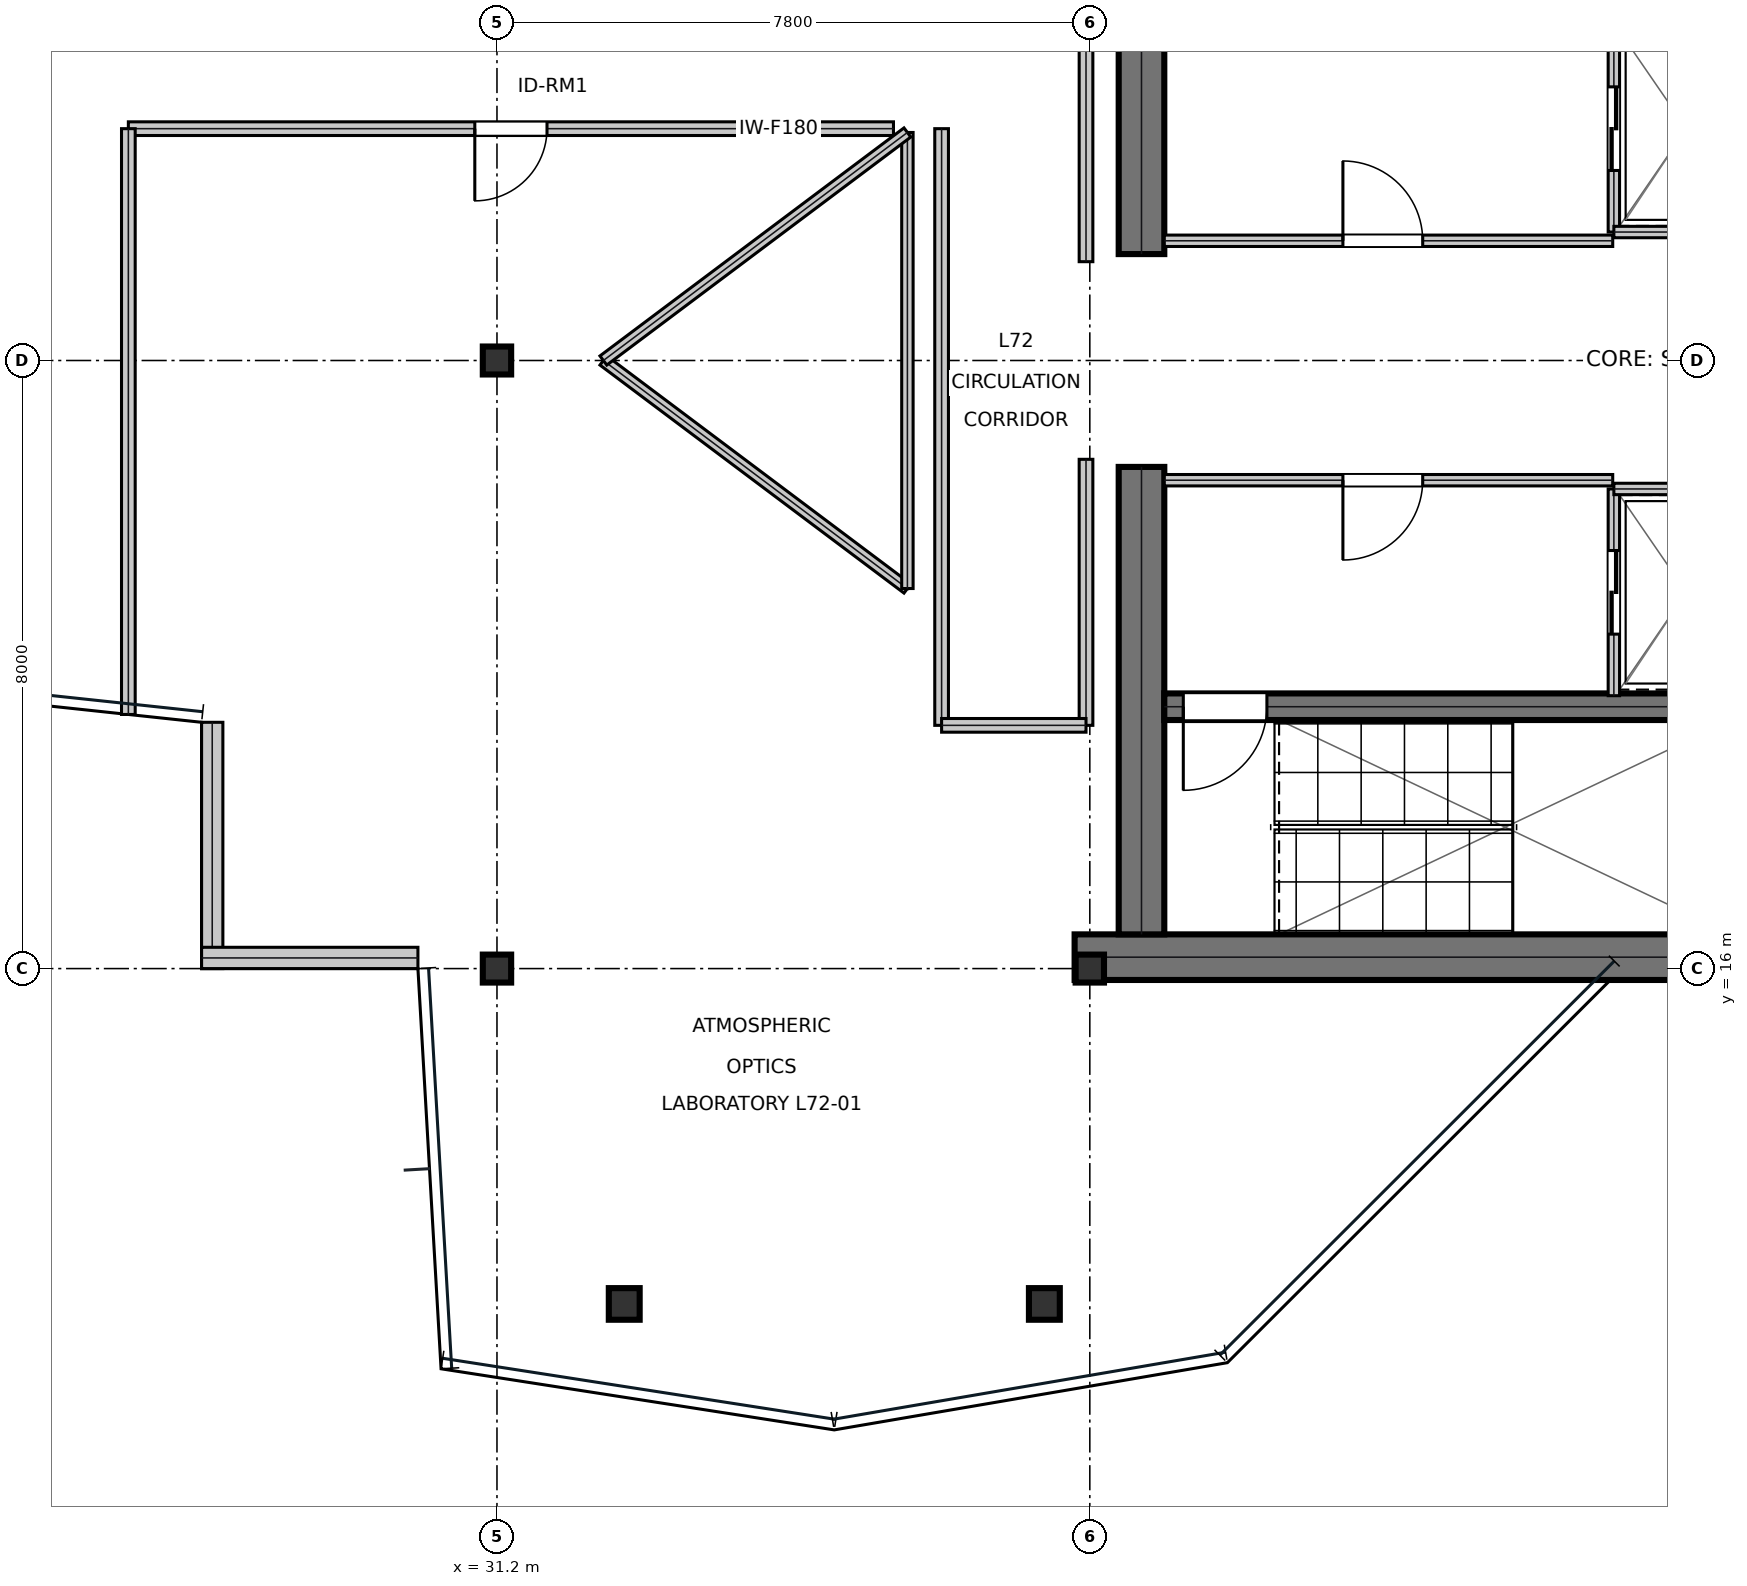
"""IFC4 building model, lengths in metres.
Left out: names, types, materials, properties, quantities, classifications, styles, units other than length and angle.
Written with IfcOpenShell. Run it as: python <this file> out.ifc"""

import sys

from ifc_helpers import new_model, si_unit, direction, frame, frame_2d, origin, origin_2d, place, context, subcontext, project, spatial, rectangle, i_section, extrude, element, fill, save


model = new_model("IFC4")
c1 = context("Model", 3, precision=1e-05, world=origin(), true_north=direction((0.0, 1.0)))
c2 = subcontext(c1, "Body", "Model", "MODEL_VIEW")
j1 = project(units=[si_unit("LENGTHUNIT", "METRE"), si_unit("PLANEANGLEUNIT", "RADIAN")], contexts=[c1])
p1 = place(None, origin())
s1 = spatial("IfcSite", under=j1, at=p1, CompositionType="ELEMENT")
p2 = place(p1, origin())
s2 = spatial("IfcBuilding", under=s1, at=p2, CompositionType="ELEMENT")
p3 = place(p2, frame((0.0, 0.0, 307.35)))
s3 = spatial("IfcBuildingStorey", under=s2, at=p3, CompositionType="ELEMENT", Elevation=307.35)
p4 = place(p3, frame((38.8, 16.15, 0.0), z_axis=(0.0, 0.0, 1.0), x_axis=(1.0, 0.0, 0.0)))
e1 = element("IfcWall", 1, at=p4, inside=s3, PredefinedType="SHEAR", context=c2, shape_type="SweptSolid", body=[
    extrude(rectangle(XDim=16.0, YDim=0.6, at=frame_2d((8.0, 0.0))), origin(), (0.0, 0.0, 1.0), 3.81),
])
for number, where, z_axis, x_axis in (
    (2, (39.68, 16.45, 0.0), (0.0, 0.0, 1.0), (0.0, 1.0, 0.0)),
    (3, (39.68, 25.4, 0.0), (0.0, 0.0, 1.0), (0.0, 1.0, 0.0)),
):
    element("IfcWall", number, at=place(p3, frame(where, z_axis=z_axis, x_axis=x_axis)), inside=s3, PredefinedType="SHEAR", context=c2, shape_type="SweptSolid", body=[
        extrude(rectangle(XDim=6.15, YDim=0.6, at=frame_2d((3.075, 0.0))), origin(), (0.0, 0.0, 1.0), 3.81),
    ])
p5 = place(p3, frame((39.98, 19.445, 0.0), z_axis=(0.0, 0.0, 1.0), x_axis=(1.0, 0.0, 0.0)))
e4 = element("IfcWall", 4, at=p5, inside=s3, PredefinedType="SHEAR", context=c2, shape_type="SweptSolid", body=[
    extrude(rectangle(XDim=7.71, YDim=0.35, at=frame_2d((3.855, 0.0))), origin(), (0.0, 0.0, 1.0), 3.81),
])
p6 = place(p5, frame((0.25, 0.0, 0.0)))
e5 = element("IfcOpeningElement", 5, at=p6, cuts=e4, PredefinedType="OPENING", context=c2, shape_type="SweptSolid", body=[
    extrude(rectangle(XDim=1.1, YDim=2.15, at=frame_2d((0.55, 1.075))), frame((0.0, 0.185, 0.0), z_axis=(0.0, -1.0, 0.0), x_axis=(1.0, 0.0, 0.0)), (0.0, 0.0, 1.0), 0.37),
])
for number, where, z_axis, x_axis in (
    (6, (31.2, 16.0, 0.0), (0.0, 0.0, 1.0), (1.0, 0.0, 0.0)),
    (7, (31.2, 24.0, 0.0), (0.0, 0.0, 1.0), (1.0, 0.0, 0.0)),
    (8, (39.0, 16.0, 0.0), (0.0, 0.0, 1.0), (1.0, 0.0, 0.0)),
):
    element("IfcColumn", number, at=place(p3, frame(where, z_axis=z_axis, x_axis=x_axis)), inside=s3, PredefinedType="COLUMN", context=c2, shape_type="SweptSolid", body=[
        extrude(i_section(OverallWidth=0.373, OverallDepth=0.368, WebThickness=0.015, FlangeThickness=0.024, at=origin_2d()), origin(), (0.0, 0.0, 1.0), 4.044),
    ])
for number, where, z_axis, x_axis in (
    (9, (32.875, 11.588, 0.016), (0.0, 0.0, 1.0), (1.0, 0.0, 0.0)),
    (10, (38.402, 11.588, 0.016), (0.0, 0.0, 1.0), (1.0, 0.0, 0.0)),
):
    element("IfcColumn", number, at=place(p3, frame(where, z_axis=z_axis, x_axis=x_axis)), inside=s3, PredefinedType="COLUMN", context=c2, shape_type="SweptSolid", body=[
        extrude(i_section(OverallWidth=0.406, OverallDepth=0.416, WebThickness=0.03, FlangeThickness=0.048, at=origin_2d()), origin(), (0.0, 0.0, 1.0), 4.018),
    ])
p7 = place(p3, frame((27.454, 19.24, 0.0), z_axis=(0.0, 0.0, 1.0), x_axis=(0.0, -1.0, 0.0)))
e11 = element("IfcWall", 11, at=p7, inside=s3, PredefinedType="STANDARD", context=c2, shape_type="SweptSolid", body=[
    extrude(rectangle(XDim=3.24, YDim=0.28, at=frame_2d((1.62, 0.0))), origin(), (0.0, 0.0, 1.0), 3.339),
])
p8 = place(p3, frame((27.314, 16.14, 0.0), z_axis=(0.0, 0.0, 1.0), x_axis=(1.0, 0.0, 0.0)))
e12 = element("IfcWall", 12, at=p8, inside=s3, PredefinedType="STANDARD", context=c2, shape_type="SweptSolid", body=[
    extrude(rectangle(XDim=2.846, YDim=0.28, at=frame_2d((1.423, 0.0))), origin(), (0.0, 0.0, 1.0), 3.81),
])
p9 = place(p3, frame((39.98, 25.575, 0.0), z_axis=(0.0, 0.0, 1.0), x_axis=(1.0, 0.0, 0.0)))
e13 = element("IfcWall", 13, at=p9, inside=s3, PredefinedType="PARTITIONING", context=c2, shape_type="SweptSolid", body=[
    extrude(rectangle(XDim=5.9, YDim=0.15, at=frame_2d((2.95, 0.0))), origin(), (0.0, 0.0, 1.0), 3.81),
])
p10 = place(p9, frame((2.35, 0.0, 0.0)))
e14 = element("IfcOpeningElement", 14, at=p10, cuts=e13, PredefinedType="OPENING", context=c2, shape_type="SweptSolid", body=[
    extrude(rectangle(XDim=1.05, YDim=2.15, at=frame_2d((0.525, 1.075))), frame((0.0, 0.085, 0.0), z_axis=(0.0, -1.0, 0.0), x_axis=(1.0, 0.0, 0.0)), (0.0, 0.0, 1.0), 0.17),
])
p11 = place(p3, frame((39.98, 22.425, 0.0), z_axis=(0.0, 0.0, 1.0), x_axis=(1.0, 0.0, 0.0)))
e15 = element("IfcWall", 15, at=p11, inside=s3, PredefinedType="PARTITIONING", context=c2, shape_type="SweptSolid", body=[
    extrude(rectangle(XDim=5.9, YDim=0.15, at=frame_2d((2.95, 0.0))), origin(), (0.0, 0.0, 1.0), 3.81),
])
p12 = place(p11, frame((2.35, 0.0, 0.0)))
e16 = element("IfcOpeningElement", 16, at=p12, cuts=e15, PredefinedType="OPENING", context=c2, shape_type="SweptSolid", body=[
    extrude(rectangle(XDim=1.05, YDim=2.15, at=frame_2d((0.525, 1.075))), frame((0.0, 0.085, 0.0), z_axis=(0.0, -1.0, 0.0), x_axis=(1.0, 0.0, 0.0)), (0.0, 0.0, 1.0), 0.17),
])
p13 = place(p3, frame((45.895, 25.69, 0.0), z_axis=(0.0, 0.0, 1.0), x_axis=(0.0, 1.0, 0.0)))
e17 = element("IfcWall", 17, at=p13, inside=s3, PredefinedType="PARTITIONING", context=c2, shape_type="SweptSolid", body=[
    extrude(rectangle(XDim=2.72, YDim=0.15, at=frame_2d((1.36, 0.0))), origin(), (0.0, 0.0, 1.0), 3.81),
])
p14 = place(p13, frame((0.81, 0.0, 0.0)))
e18 = element("IfcOpeningElement", 18, at=p14, cuts=e17, PredefinedType="OPENING", context=c2, shape_type="SweptSolid", body=[
    extrude(rectangle(XDim=1.1, YDim=2.15, at=frame_2d((0.55, 1.075))), frame((0.0, 0.085, 0.0), z_axis=(0.0, -1.0, 0.0), x_axis=(1.0, 0.0, 0.0)), (0.0, 0.0, 1.0), 0.17),
])
p15 = place(p3, frame((45.895, 25.69, 0.0), z_axis=(0.0, 0.0, 1.0), x_axis=(1.0, 0.0, 0.0)))
e19 = element("IfcWall", 19, at=p15, inside=s3, PredefinedType="PARTITIONING", context=c2, shape_type="SweptSolid", body=[
    extrude(rectangle(XDim=1.915, YDim=0.15, at=frame_2d((0.958, 0.0))), origin(), (0.0, 0.0, 1.0), 3.81),
])
p16 = place(p3, frame((45.895, 19.59, 0.0), z_axis=(0.0, 0.0, 1.0), x_axis=(0.0, 1.0, 0.0)))
e20 = element("IfcWall", 20, at=p16, inside=s3, PredefinedType="PARTITIONING", context=c2, shape_type="SweptSolid", body=[
    extrude(rectangle(XDim=2.72, YDim=0.15, at=frame_2d((1.36, 0.0))), origin(), (0.0, 0.0, 1.0), 3.81),
])
p17 = place(p16, frame((0.81, 0.0, 0.0)))
e21 = element("IfcOpeningElement", 21, at=p17, cuts=e20, PredefinedType="OPENING", context=c2, shape_type="SweptSolid", body=[
    extrude(rectangle(XDim=1.1, YDim=2.15, at=frame_2d((0.55, 1.075))), frame((0.0, 0.085, 0.0), z_axis=(0.0, -1.0, 0.0), x_axis=(1.0, 0.0, 0.0)), (0.0, 0.0, 1.0), 0.17),
])
p18 = place(p3, frame((45.895, 22.31, 0.0), z_axis=(0.0, 0.0, 1.0), x_axis=(1.0, 0.0, 0.0)))
e22 = element("IfcWall", 22, at=p18, inside=s3, PredefinedType="PARTITIONING", context=c2, shape_type="SweptSolid", body=[
    extrude(rectangle(XDim=1.915, YDim=0.15, at=frame_2d((0.958, 0.0))), origin(), (0.0, 0.0, 1.0), 3.81),
])
p19 = place(p3, frame((26.35, 27.05, 0.0), z_axis=(0.0, 0.0, 1.0), x_axis=(1.0, 0.0, 0.0)))
e23 = element("IfcWall", 23, at=p19, inside=s3, PredefinedType="SOLIDWALL", context=c2, shape_type="SweptSolid", body=[
    extrude(rectangle(XDim=10.067, YDim=0.18, at=frame_2d((5.033, 0.0))), origin(), (0.0, 0.0, 1.0), 3.27),
])
p20 = place(p19, frame((4.558, 0.0, 0.0)))
e24 = element("IfcOpeningElement", 24, at=p20, cuts=e23, PredefinedType="OPENING", context=c2, shape_type="SweptSolid", body=[
    extrude(rectangle(XDim=0.95, YDim=2.15, at=frame_2d((0.475, 1.075))), frame((0.0, 0.1, 0.0), z_axis=(0.0, -1.0, 0.0), x_axis=(1.0, 0.0, 0.0)), (0.0, 0.0, 1.0), 0.2),
])
p21 = place(p3, frame((37.05, 19.2, 0.0), z_axis=(0.0, 0.0, 1.0), x_axis=(0.0, 1.0, 0.0)))
e25 = element("IfcWall", 25, at=p21, inside=s3, PredefinedType="SOLIDWALL", context=c2, shape_type="SweptSolid", body=[
    extrude(rectangle(XDim=7.85, YDim=0.18, at=frame_2d((3.925, 0.0))), origin(), (0.0, 0.0, 1.0), 3.54),
])
p22 = place(p3, frame((26.35, 19.343, 0.0), z_axis=(0.0, 0.0, 1.0), x_axis=(0.0, 1.0, 0.0)))
e26 = element("IfcWall", 26, at=p22, inside=s3, PredefinedType="SOLIDWALL", context=c2, shape_type="SweptSolid", body=[
    extrude(rectangle(XDim=7.707, YDim=0.18, at=frame_2d((3.854, 0.0))), origin(), (0.0, 0.0, 1.0), 3.27),
])
p23 = place(p3, frame((38.95, 19.2, 0.0), z_axis=(0.0, 0.0, 1.0), x_axis=(0.0, 1.0, 0.0)))
e27 = element("IfcWall", 27, at=p23, inside=s3, PredefinedType="SOLIDWALL", context=c2, shape_type="SweptSolid", body=[
    extrude(rectangle(XDim=3.5, YDim=0.18, at=frame_2d((1.75, 0.0))), origin(), (0.0, 0.0, 1.0), 3.54),
])
p24 = place(p3, frame((37.05, 19.2, 0.0), z_axis=(0.0, 0.0, 1.0), x_axis=(1.0, 0.0, 0.0)))
e28 = element("IfcWall", 28, at=p24, inside=s3, PredefinedType="SOLIDWALL", context=c2, shape_type="SweptSolid", body=[
    extrude(rectangle(XDim=1.9, YDim=0.18, at=frame_2d((0.95, 0.0))), origin(), (0.0, 0.0, 1.0), 3.81),
])
p25 = place(p3, frame((38.95, 25.3, 0.0), z_axis=(0.0, 0.0, 1.0), x_axis=(0.0, 1.0, 0.0)))
e29 = element("IfcWall", 29, at=p25, inside=s3, PredefinedType="SOLIDWALL", context=c2, shape_type="SweptSolid", body=[
    extrude(rectangle(XDim=3.5, YDim=0.18, at=frame_2d((1.75, 0.0))), origin(), (0.0, 0.0, 1.0), 3.54),
])
p26 = place(p3, frame((32.6, 24.0, 0.0), z_axis=(0.0, 0.0, 1.0), x_axis=(0.8, -0.6, 0.0)))
e30 = element("IfcWall", 30, at=p26, inside=s3, PredefinedType="MOVABLE", context=c2, shape_type="SweptSolid", body=[
    extrude(rectangle(XDim=5.0, YDim=0.15, at=frame_2d((2.5, 0.0))), origin(), (0.0, 0.0, 1.0), 3.81),
])
p27 = place(p3, frame((36.6, 21.0, 0.0), z_axis=(0.0, 0.0, 1.0), x_axis=(0.0, 1.0, 0.0)))
e31 = element("IfcWall", 31, at=p27, inside=s3, PredefinedType="MOVABLE", context=c2, shape_type="SweptSolid", body=[
    extrude(rectangle(XDim=6.0, YDim=0.15, at=frame_2d((3.0, 0.0))), origin(), (0.0, 0.0, 1.0), 3.81),
])
p28 = place(p3, frame((36.6, 27.0, 0.0), z_axis=(0.0, 0.0, 1.0), x_axis=(-0.8, -0.6, 0.0)))
e32 = element("IfcWall", 32, at=p28, inside=s3, PredefinedType="MOVABLE", context=c2, shape_type="SweptSolid", body=[
    extrude(rectangle(XDim=5.0, YDim=0.15, at=frame_2d((2.5, 0.0))), origin(), (0.0, 0.0, 1.0), 3.81),
])
p29 = place(p10, origin())
e33 = element("IfcDoor", 33, at=p29, inside=s3, OperationType="SINGLE_SWING_LEFT", PredefinedType="DOOR", context=c2, shape_type="SweptSolid", body=[
    extrude(rectangle(XDim=1.05, YDim=2.15, at=frame_2d((0.525, 1.075))), frame((0.0, 0.025, 0.0), z_axis=(0.0, -1.0, 0.0), x_axis=(1.0, 0.0, 0.0)), (0.0, 0.0, 1.0), 0.05),
])
fill(e14, e33)
p30 = place(p12, frame((1.05, 0.0, 0.0), z_axis=(0.0, 0.0, 1.0), x_axis=(-1.0, 0.0, 0.0)))
e34 = element("IfcDoor", 34, at=p30, inside=s3, OperationType="SINGLE_SWING_RIGHT", PredefinedType="DOOR", context=c2, shape_type="SweptSolid", body=[
    extrude(rectangle(XDim=1.05, YDim=2.15, at=frame_2d((0.525, 1.075))), frame((0.0, 0.025, 0.0), z_axis=(0.0, -1.0, 0.0), x_axis=(1.0, 0.0, 0.0)), (0.0, 0.0, 1.0), 0.05),
])
fill(e16, e34)
p31 = place(p14, frame((1.1, 0.0, 0.0), z_axis=(0.0, 0.0, 1.0), x_axis=(-1.0, 0.0, 0.0)))
e35 = element("IfcDoor", 35, at=p31, inside=s3, OperationType="DOUBLE_DOOR_SLIDING", PredefinedType="DOOR", context=c2, shape_type="SweptSolid", body=[
    extrude(rectangle(XDim=1.1, YDim=2.15, at=frame_2d((0.55, 1.075))), frame((0.0, 0.025, 0.0), z_axis=(0.0, -1.0, 0.0), x_axis=(1.0, 0.0, 0.0)), (0.0, 0.0, 1.0), 0.05),
])
fill(e18, e35)
p32 = place(p17, frame((1.1, 0.0, 0.0), z_axis=(0.0, 0.0, 1.0), x_axis=(-1.0, 0.0, 0.0)))
e36 = element("IfcDoor", 36, at=p32, inside=s3, OperationType="DOUBLE_DOOR_SLIDING", PredefinedType="DOOR", context=c2, shape_type="SweptSolid", body=[
    extrude(rectangle(XDim=1.1, YDim=2.15, at=frame_2d((0.55, 1.075))), frame((0.0, 0.025, 0.0), z_axis=(0.0, -1.0, 0.0), x_axis=(1.0, 0.0, 0.0)), (0.0, 0.0, 1.0), 0.05),
])
fill(e21, e36)
p33 = place(p20, frame((0.95, 0.0, 0.0), z_axis=(0.0, 0.0, 1.0), x_axis=(-1.0, 0.0, 0.0)))
e37 = element("IfcDoor", 37, at=p33, inside=s3, OperationType="SINGLE_SWING_RIGHT", PredefinedType="DOOR", context=c2, shape_type="SweptSolid", body=[
    extrude(rectangle(XDim=0.95, YDim=2.15, at=frame_2d((0.475, 1.075))), frame((0.0, 0.025, 0.0), z_axis=(0.0, -1.0, 0.0), x_axis=(1.0, 0.0, 0.0)), (0.0, 0.0, 1.0), 0.05),
])
fill(e24, e37)
p34 = place(p6, frame((1.1, 0.0, 0.0), z_axis=(0.0, 0.0, 1.0), x_axis=(-1.0, 0.0, 0.0)))
e38 = element("IfcDoor", 38, at=p34, inside=s3, OperationType="SINGLE_SWING_RIGHT", PredefinedType="DOOR", context=c2, shape_type="SweptSolid", body=[
    extrude(rectangle(XDim=1.1, YDim=2.15, at=frame_2d((0.55, 1.075))), frame((0.0, 0.025, 0.0), z_axis=(0.0, -1.0, 0.0), x_axis=(1.0, 0.0, 0.0)), (0.0, 0.0, 1.0), 0.05),
])
fill(e5, e38)
save(model, sys.argv[1])
